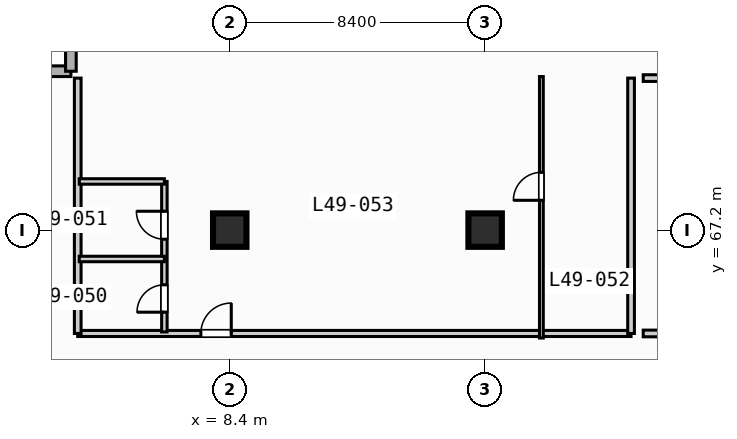
"""IFC4 building model, lengths in metres.
Left out: names, types, materials, properties, quantities, classifications, styles, units other than length and angle.
Written with IfcOpenShell. Run it as: python <this file> out.ifc"""

import sys

from ifc_helpers import new_model, si_unit, direction, frame, frame_2d, origin, origin_2d, place, context, subcontext, project, spatial, rectangle, extrude, element, fill, save


model = new_model("IFC4")
c1 = context("Model", 3, precision=1e-05, world=origin(), true_north=direction((0.0, 1.0)))
c2 = subcontext(c1, "Body", "Model", "MODEL_VIEW")
j1 = project(units=[si_unit("LENGTHUNIT", "METRE"), si_unit("PLANEANGLEUNIT", "RADIAN")], contexts=[c1])
p1 = place(None, origin())
s1 = spatial("IfcSite", under=j1, at=p1, CompositionType="ELEMENT")
p2 = place(p1, origin())
s2 = spatial("IfcBuilding", under=s1, at=p2, CompositionType="ELEMENT")
p3 = place(p2, frame((0.0, 0.0, 201.3)))
s3 = spatial("IfcBuildingStorey", under=s2, at=p3, CompositionType="ELEMENT", Elevation=201.3)
for number, where, z_axis, x_axis in (
    (1, (8.4, 67.2, 0.0), (0.0, 0.0, 1.0), (1.0, 0.0, 0.0)),
    (2, (16.8, 67.2, 0.0), (0.0, 0.0, 1.0), (1.0, 0.0, 0.0)),
):
    element("IfcColumn", number, at=place(p3, frame(where, z_axis=z_axis, x_axis=x_axis)), inside=s3, PredefinedType="COLUMN", context=c2, shape_type="SweptSolid", body=[
        extrude(rectangle(XDim=1.1, YDim=1.1, at=origin_2d()), origin(), (0.0, 0.0, 1.0), 3.7),
    ])
for number, where, z_axis, x_axis in (
    (3, (0.175, 72.425, 0.0), (0.0, 0.0, 1.0), (1.0, 0.0, 0.0)),
    (4, (3.175, 72.425, 0.0), (0.0, 0.0, 1.0), (0.0, 1.0, 0.0)),
):
    element("IfcWall", number, at=place(p3, frame(where, z_axis=z_axis, x_axis=x_axis)), inside=s3, PredefinedType="STANDARD", context=c2, shape_type="SweptSolid", body=[
        extrude(rectangle(XDim=3.0, YDim=0.35, at=frame_2d((1.5, 0.0))), origin(), (0.0, 0.0, 1.0), 3.47),
    ])
p4 = place(p3, frame((3.4, 63.8, 0.0), z_axis=(0.0, 0.0, 1.0), x_axis=(1.0, 0.0, 0.0)))
e5 = element("IfcWall", 5, at=p4, inside=s3, PredefinedType="PARTITIONING", context=c2, shape_type="SweptSolid", body=[
    extrude(rectangle(XDim=18.2, YDim=0.2, at=frame_2d((9.1, 0.0))), origin(), (0.0, 0.0, 1.0), 3.47),
])
p5 = place(p4, frame((4.05, 0.0, 0.0)))
e6 = element("IfcOpeningElement", 6, at=p5, cuts=e5, PredefinedType="OPENING", context=c2, shape_type="SweptSolid", body=[
    extrude(rectangle(XDim=1.0, YDim=2.15, at=frame_2d((0.5, 1.075))), frame((0.0, 0.11, 0.0), z_axis=(0.0, -1.0, 0.0), x_axis=(1.0, 0.0, 0.0)), (0.0, 0.0, 1.0), 0.22),
])
for number, where, z_axis, x_axis in (
    (7, (21.6, 63.8, 0.0), (0.0, 0.0, 1.0), (0.0, 1.0, 0.0)),
    (8, (3.4, 63.8, 0.0), (0.0, 0.0, 1.0), (0.0, 1.0, 0.0)),
):
    element("IfcWall", number, at=place(p3, frame(where, z_axis=z_axis, x_axis=x_axis)), inside=s3, PredefinedType="PARTITIONING", context=c2, shape_type="SweptSolid", body=[
        extrude(rectangle(XDim=8.4, YDim=0.22, at=frame_2d((4.2, 0.0))), origin(), (0.0, 0.0, 1.0), 3.47),
    ])
p6 = place(p3, frame((6.25, 63.85, 0.0), z_axis=(0.0, 0.0, 1.0), x_axis=(0.0, 1.0, 0.0)))
e9 = element("IfcWall", 9, at=p6, inside=s3, PredefinedType="PLUMBINGWALL", context=c2, shape_type="SweptSolid", body=[
    extrude(rectangle(XDim=4.95, YDim=0.18, at=frame_2d((2.475, 0.0))), origin(), (0.0, 0.0, 1.0), 3.47),
])
p7 = place(p6, frame((0.65, 0.0, 0.0)))
e10 = element("IfcOpeningElement", 10, at=p7, cuts=e9, PredefinedType="OPENING", context=c2, shape_type="SweptSolid", body=[
    extrude(rectangle(XDim=0.9, YDim=2.1, at=frame_2d((0.45, 1.05))), frame((0.0, 0.1, 0.0), z_axis=(0.0, -1.0, 0.0), x_axis=(1.0, 0.0, 0.0)), (0.0, 0.0, 1.0), 0.2),
])
p8 = place(p6, frame((3.05, 0.0, 0.0)))
e11 = element("IfcOpeningElement", 11, at=p8, cuts=e9, PredefinedType="OPENING", context=c2, shape_type="SweptSolid", body=[
    extrude(rectangle(XDim=0.92, YDim=2.1, at=frame_2d((0.46, 1.05))), frame((0.0, 0.1, 0.0), z_axis=(0.0, -1.0, 0.0), x_axis=(1.0, 0.0, 0.0)), (0.0, 0.0, 1.0), 0.2),
])
for number, where, z_axis, x_axis in (
    (12, (3.45, 66.25, 0.0), (0.0, 0.0, 1.0), (1.0, 0.0, 0.0)),
    (13, (3.45, 68.8, 0.0), (0.0, 0.0, 1.0), (1.0, 0.0, 0.0)),
):
    element("IfcWall", number, at=place(p3, frame(where, z_axis=z_axis, x_axis=x_axis)), inside=s3, PredefinedType="PLUMBINGWALL", context=c2, shape_type="SweptSolid", body=[
        extrude(rectangle(XDim=2.8, YDim=0.18, at=frame_2d((1.4, 0.0))), origin(), (0.0, 0.0, 1.0), 3.47),
    ])
p9 = place(p3, frame((18.65, 63.65, 0.0), z_axis=(0.0, 0.0, 1.0), x_axis=(0.0, 1.0, 0.0)))
e14 = element("IfcWall", 14, at=p9, inside=s3, PredefinedType="PARTITIONING", context=c2, shape_type="SweptSolid", body=[
    extrude(rectangle(XDim=8.6, YDim=0.125, at=frame_2d((4.3, 0.0))), origin(), (0.0, 0.0, 1.0), 3.47),
])
p10 = place(p9, frame((4.53, 0.0, 0.0)))
e15 = element("IfcOpeningElement", 15, at=p10, cuts=e14, PredefinedType="OPENING", context=c2, shape_type="SweptSolid", body=[
    extrude(rectangle(XDim=0.92, YDim=2.1, at=frame_2d((0.46, 1.05))), frame((0.0, 0.073, 0.0), z_axis=(0.0, -1.0, 0.0), x_axis=(1.0, 0.0, 0.0)), (0.0, 0.0, 1.0), 0.145),
])
p11 = place(p3, frame((22.0, 72.2, 0.0), z_axis=(0.0, 0.0, 1.0), x_axis=(1.0, 0.0, 0.0)))
e16 = element("IfcWall", 16, at=p11, inside=s3, PredefinedType="PARTITIONING", context=c2, shape_type="SweptSolid", body=[
    extrude(rectangle(XDim=11.3, YDim=0.22, at=frame_2d((5.65, 0.0))), origin(), (0.0, 0.0, 1.0), 3.47),
])
p12 = place(p3, frame((22.0, 63.8, 0.0), z_axis=(0.0, 0.0, 1.0), x_axis=(1.0, 0.0, 0.0)))
e17 = element("IfcWall", 17, at=p12, inside=s3, PredefinedType="PARTITIONING", context=c2, shape_type="SweptSolid", body=[
    extrude(rectangle(XDim=6.0, YDim=0.22, at=frame_2d((3.0, 0.0))), origin(), (0.0, 0.0, 1.0), 3.47),
])
p13 = place(p5, origin())
e18 = element("IfcDoor", 18, at=p13, inside=s3, OperationType="SINGLE_SWING_RIGHT", PredefinedType="DOOR", context=c2, shape_type="SweptSolid", body=[
    extrude(rectangle(XDim=1.0, YDim=2.15, at=frame_2d((0.5, 1.075))), frame((0.0, 0.025, 0.0), z_axis=(0.0, -1.0, 0.0), x_axis=(1.0, 0.0, 0.0)), (0.0, 0.0, 1.0), 0.05),
])
fill(e6, e18)
p14 = place(p7, origin())
e19 = element("IfcDoor", 19, at=p14, inside=s3, OperationType="SINGLE_SWING_LEFT", PredefinedType="DOOR", context=c2, shape_type="SweptSolid", body=[
    extrude(rectangle(XDim=0.9, YDim=2.1, at=frame_2d((0.45, 1.05))), frame((0.0, 0.025, 0.0), z_axis=(0.0, -1.0, 0.0), x_axis=(1.0, 0.0, 0.0)), (0.0, 0.0, 1.0), 0.05),
])
fill(e10, e19)
p15 = place(p8, origin())
e20 = element("IfcDoor", 20, at=p15, inside=s3, OperationType="SINGLE_SWING_RIGHT", PredefinedType="DOOR", context=c2, shape_type="SweptSolid", body=[
    extrude(rectangle(XDim=0.92, YDim=2.1, at=frame_2d((0.46, 1.05))), frame((0.0, 0.025, 0.0), z_axis=(0.0, -1.0, 0.0), x_axis=(1.0, 0.0, 0.0)), (0.0, 0.0, 1.0), 0.05),
])
fill(e11, e20)
p16 = place(p10, origin())
e21 = element("IfcDoor", 21, at=p16, inside=s3, OperationType="SINGLE_SWING_LEFT", PredefinedType="DOOR", context=c2, shape_type="SweptSolid", body=[
    extrude(rectangle(XDim=0.92, YDim=2.1, at=frame_2d((0.46, 1.05))), frame((0.0, 0.025, 0.0), z_axis=(0.0, -1.0, 0.0), x_axis=(1.0, 0.0, 0.0)), (0.0, 0.0, 1.0), 0.05),
])
fill(e15, e21)
save(model, sys.argv[1])
